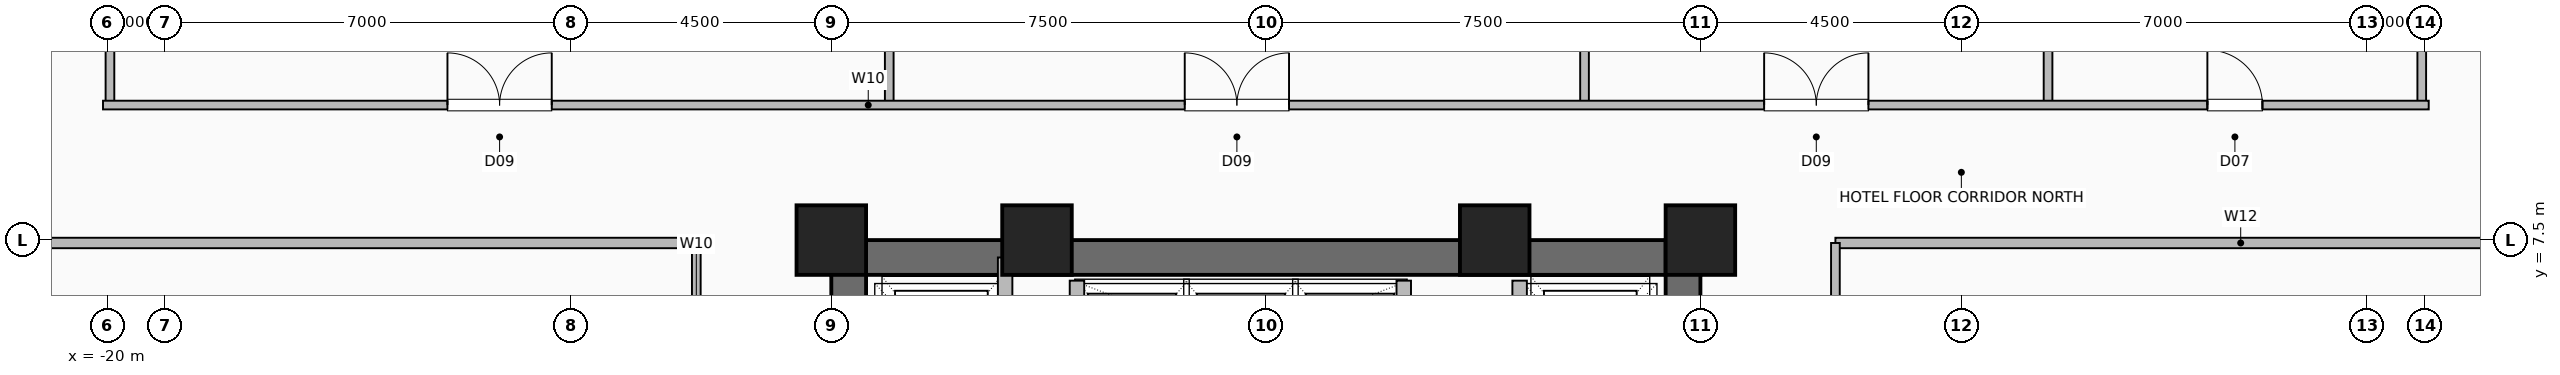
"""IFC4 building model, lengths in metres.
Left out: names, types, materials, properties, quantities, classifications, styles, units other than length and angle.
Written with IfcOpenShell. Run it as: python <this file> out.ifc"""

import sys

from ifc_helpers import new_model, si_unit, direction, frame, frame_2d, origin, origin_2d, place, context, subcontext, project, spatial, rectangle, hollow_rectangle, extrude, element, fill, save


model = new_model("IFC4")
c1 = context("Model", 3, precision=1e-05, world=origin(), true_north=direction((0.0, 1.0)))
c2 = subcontext(c1, "Body", "Model", "MODEL_VIEW")
j1 = project(units=[si_unit("LENGTHUNIT", "METRE"), si_unit("PLANEANGLEUNIT", "RADIAN")], contexts=[c1])
p1 = place(None, origin())
s1 = spatial("IfcSite", under=j1, at=p1, CompositionType="ELEMENT")
p2 = place(p1, origin())
s2 = spatial("IfcBuilding", under=s1, at=p2, CompositionType="ELEMENT")
p3 = place(p2, frame((0.0, 0.0, 55.0)))
s3 = spatial("IfcBuildingStorey", under=s2, at=p3, CompositionType="ELEMENT", Elevation=55.0)
for number, where, z_axis, x_axis in (
    (1, (7.5, 7.5, 0.0), (0.0, 0.0, 1.0), (1.0, 0.0, 0.0)),
    (2, (3.95, 7.5, 0.0), (0.0, 0.0, 1.0), (1.0, 0.0, 0.0)),
    (3, (-3.95, 7.5, 0.0), (0.0, 0.0, 1.0), (1.0, 0.0, 0.0)),
    (4, (-7.5, 7.5, 0.0), (0.0, 0.0, 1.0), (1.0, 0.0, 0.0)),
):
    element("IfcColumn", number, at=place(p3, frame(where, z_axis=z_axis, x_axis=x_axis)), inside=s3, PredefinedType="COLUMN", context=c2, shape_type="SweptSolid", body=[
        extrude(hollow_rectangle(XDim=1.2, YDim=1.2, WallThickness=0.055, at=origin_2d()), origin(), (0.0, 0.0, 1.0), 3.5),
    ])
p4 = place(p3, frame((-7.5, 7.2, 0.0), z_axis=(0.0, 0.0, 1.0), x_axis=(1.0, 0.0, 0.0)))
e5 = element("IfcWall", 5, at=p4, inside=s3, PredefinedType="SHEAR", context=c2, shape_type="SweptSolid", body=[
    extrude(rectangle(XDim=15.0, YDim=0.6, at=frame_2d((7.5, 0.0))), origin(), (0.0, 0.0, 1.0), 3.25),
])
p5 = place(p3, frame((-7.2, -7.5, 0.0), z_axis=(0.0, 0.0, 1.0), x_axis=(0.0, 1.0, 0.0)))
e6 = element("IfcWall", 6, at=p5, inside=s3, PredefinedType="SHEAR", context=c2, shape_type="SweptSolid", body=[
    extrude(rectangle(XDim=15.0, YDim=0.6, at=frame_2d((7.5, 0.0))), origin(), (0.0, 0.0, 1.0), 3.25),
])
p6 = place(p5, frame((9.5, 0.0, 0.0)))
e7 = element("IfcOpeningElement", 7, at=p6, cuts=e6, PredefinedType="OPENING", context=c2, shape_type="SweptSolid", body=[
    extrude(rectangle(XDim=1.0, YDim=2.08, at=frame_2d((0.5, 1.04))), frame((0.0, 0.31, 0.0), z_axis=(0.0, -1.0, 0.0), x_axis=(1.0, 0.0, 0.0)), (0.0, 0.0, 1.0), 0.62),
])
p7 = place(p3, frame((7.2, -7.5, 0.0), z_axis=(0.0, 0.0, 1.0), x_axis=(0.0, 1.0, 0.0)))
e8 = element("IfcWall", 8, at=p7, inside=s3, PredefinedType="SHEAR", context=c2, shape_type="SweptSolid", body=[
    extrude(rectangle(XDim=15.0, YDim=0.6, at=frame_2d((7.5, 0.0))), origin(), (0.0, 0.0, 1.0), 3.25),
])
for number, where, z_axis, x_axis in (
    (9, (-3.26, 4.58, 0.0), (0.0, 0.0, 1.0), (0.0, 1.0, 0.0)),
    (10, (2.38, 4.58, 0.0), (0.0, 0.0, 1.0), (0.0, 1.0, 0.0)),
):
    element("IfcWall", number, at=place(p3, frame(where, z_axis=z_axis, x_axis=x_axis)), inside=s3, PredefinedType="SHEAR", context=c2, shape_type="SweptSolid", body=[
        extrude(rectangle(XDim=2.22, YDim=0.25, at=frame_2d((1.11, 0.0))), origin(), (0.0, 0.0, 1.0), 3.25),
    ])
p8 = place(p3, frame((-4.5, 4.35, 0.0), z_axis=(0.0, 0.0, 1.0), x_axis=(0.0, 1.0, 0.0)))
e11 = element("IfcWall", 11, at=p8, inside=s3, PredefinedType="SHEAR", context=c2, shape_type="SweptSolid", body=[
    extrude(rectangle(XDim=2.85, YDim=0.25, at=frame_2d((1.425, 0.0))), origin(), (0.0, 0.0, 1.0), 3.25),
])
p9 = place(p3, frame((4.38, 4.3, 0.0), z_axis=(0.0, 0.0, 1.0), x_axis=(0.0, 1.0, 0.0)))
e12 = element("IfcWall", 12, at=p9, inside=s3, PredefinedType="SHEAR", context=c2, shape_type="SweptSolid", body=[
    extrude(rectangle(XDim=2.5, YDim=0.25, at=frame_2d((1.25, 0.0))), origin(), (0.0, 0.0, 1.0), 3.25),
])
p10 = place(p9, frame((0.8, 0.0, 0.0)))
e13 = element("IfcOpeningElement", 13, at=p10, cuts=e12, PredefinedType="OPENING", context=c2, shape_type="SweptSolid", body=[
    extrude(rectangle(XDim=1.2, YDim=2.2, at=frame_2d((0.6, 1.1))), frame((0.0, 0.135, 0.0), z_axis=(0.0, -1.0, 0.0), x_axis=(1.0, 0.0, 0.0)), (0.0, 0.0, 1.0), 0.27),
])
for number, where, z_axis, x_axis in (
    (14, (-19.95, 9.83, 0.0), (0.0, 0.0, 1.0), (0.0, 1.0, 0.0)),
    (15, (-6.5, 9.83, 0.0), (0.0, 0.0, 1.0), (0.0, 1.0, 0.0)),
    (16, (5.5, 9.83, 0.0), (0.0, 0.0, 1.0), (0.0, 1.0, 0.0)),
    (17, (13.5, 9.83, 0.0), (0.0, 0.0, 1.0), (0.0, 1.0, 0.0)),
    (18, (19.95, 9.83, 0.0), (0.0, 0.0, 1.0), (0.0, 1.0, 0.0)),
):
    element("IfcWall", number, at=place(p3, frame(where, z_axis=z_axis, x_axis=x_axis)), inside=s3, PredefinedType="PARTITIONING", context=c2, shape_type="SweptSolid", body=[
        extrude(rectangle(XDim=13.99, YDim=0.15, at=frame_2d((6.995, 0.0))), origin(), (0.0, 0.0, 1.0), 3.25),
    ])
p11 = place(p3, frame((-20.07, 9.83, 0.0), z_axis=(0.0, 0.0, 1.0), x_axis=(1.0, 0.0, 0.0)))
e19 = element("IfcWall", 19, at=p11, inside=s3, PredefinedType="PARTITIONING", context=c2, shape_type="SweptSolid", body=[
    extrude(rectangle(XDim=40.14, YDim=0.15, at=frame_2d((20.07, 0.0))), origin(), (0.0, 0.0, 1.0), 3.25),
])
p12 = place(p11, frame((5.945, 0.0, 0.0)))
e20 = element("IfcOpeningElement", 20, at=p12, cuts=e19, PredefinedType="OPENING", context=c2, shape_type="SweptSolid", body=[
    extrude(rectangle(XDim=1.8, YDim=2.08, at=frame_2d((0.9, 1.04))), frame((0.0, 0.085, 0.0), z_axis=(0.0, -1.0, 0.0), x_axis=(1.0, 0.0, 0.0)), (0.0, 0.0, 1.0), 0.17),
])
p13 = place(p11, frame((18.67, 0.0, 0.0)))
e21 = element("IfcOpeningElement", 21, at=p13, cuts=e19, PredefinedType="OPENING", context=c2, shape_type="SweptSolid", body=[
    extrude(rectangle(XDim=1.8, YDim=2.08, at=frame_2d((0.9, 1.04))), frame((0.0, 0.085, 0.0), z_axis=(0.0, -1.0, 0.0), x_axis=(1.0, 0.0, 0.0)), (0.0, 0.0, 1.0), 0.17),
])
p14 = place(p11, frame((28.67, 0.0, 0.0)))
e22 = element("IfcOpeningElement", 22, at=p14, cuts=e19, PredefinedType="OPENING", context=c2, shape_type="SweptSolid", body=[
    extrude(rectangle(XDim=1.8, YDim=2.08, at=frame_2d((0.9, 1.04))), frame((0.0, 0.085, 0.0), z_axis=(0.0, -1.0, 0.0), x_axis=(1.0, 0.0, 0.0)), (0.0, 0.0, 1.0), 0.17),
])
p15 = place(p11, frame((36.32, 0.0, 0.0)))
e23 = element("IfcOpeningElement", 23, at=p15, cuts=e19, PredefinedType="OPENING", context=c2, shape_type="SweptSolid", body=[
    extrude(rectangle(XDim=0.95, YDim=2.06, at=frame_2d((0.475, 1.03))), frame((0.0, 0.085, 0.0), z_axis=(0.0, -1.0, 0.0), x_axis=(1.0, 0.0, 0.0)), (0.0, 0.0, 1.0), 0.17),
])
p16 = place(p3, frame((-23.82, 7.45, 0.0), z_axis=(0.0, 0.0, 1.0), x_axis=(1.0, 0.0, 0.0)))
e24 = element("IfcWall", 24, at=p16, inside=s3, PredefinedType="PARTITIONING", context=c2, shape_type="SweptSolid", body=[
    extrude(rectangle(XDim=13.99, YDim=0.18, at=frame_2d((6.995, 0.0))), origin(), (0.0, 0.0, 1.0), 3.25),
])
p17 = place(p3, frame((-9.83, -7.45, 0.0), z_axis=(0.0, 0.0, 1.0), x_axis=(0.0, 1.0, 0.0)))
e25 = element("IfcWall", 25, at=p17, inside=s3, PredefinedType="PARTITIONING", context=c2, shape_type="SweptSolid", body=[
    extrude(rectangle(XDim=14.9, YDim=0.15, at=frame_2d((7.45, 0.0))), origin(), (0.0, 0.0, 1.0), 3.25),
])
p18 = place(p17, frame((3.049, 0.0, 0.0)))
e26 = element("IfcOpeningElement", 26, at=p18, cuts=e25, PredefinedType="OPENING", context=c2, shape_type="SweptSolid", body=[
    extrude(rectangle(XDim=0.95, YDim=2.08, at=frame_2d((0.475, 1.04))), frame((0.0, 0.085, 0.0), z_axis=(0.0, -1.0, 0.0), x_axis=(1.0, 0.0, 0.0)), (0.0, 0.0, 1.0), 0.17),
])
p19 = place(p17, frame((7.927, 0.0, 0.0)))
e27 = element("IfcOpeningElement", 27, at=p19, cuts=e25, PredefinedType="OPENING", context=c2, shape_type="SweptSolid", body=[
    extrude(rectangle(XDim=0.95, YDim=2.08, at=frame_2d((0.475, 1.04))), frame((0.0, 0.085, 0.0), z_axis=(0.0, -1.0, 0.0), x_axis=(1.0, 0.0, 0.0)), (0.0, 0.0, 1.0), 0.17),
])
p20 = place(p17, frame((12.899, 0.0, 0.0)))
e28 = element("IfcOpeningElement", 28, at=p20, cuts=e25, PredefinedType="OPENING", context=c2, shape_type="SweptSolid", body=[
    extrude(rectangle(XDim=0.95, YDim=2.08, at=frame_2d((0.475, 1.04))), frame((0.0, 0.085, 0.0), z_axis=(0.0, -1.0, 0.0), x_axis=(1.0, 0.0, 0.0)), (0.0, 0.0, 1.0), 0.17),
])
p21 = place(p3, frame((9.83, 7.45, 0.0), z_axis=(0.0, 0.0, 1.0), x_axis=(1.0, 0.0, 0.0)))
e29 = element("IfcWall", 29, at=p21, inside=s3, PredefinedType="PARTITIONING", context=c2, shape_type="SweptSolid", body=[
    extrude(rectangle(XDim=13.99, YDim=0.18, at=frame_2d((6.995, 0.0))), origin(), (0.0, 0.0, 1.0), 3.25),
])
p22 = place(p3, frame((9.83, -7.45, 0.0), z_axis=(0.0, 0.0, 1.0), x_axis=(0.0, 1.0, 0.0)))
e30 = element("IfcWall", 30, at=p22, inside=s3, PredefinedType="PARTITIONING", context=c2, shape_type="SweptSolid", body=[
    extrude(rectangle(XDim=14.9, YDim=0.15, at=frame_2d((7.45, 0.0))), origin(), (0.0, 0.0, 1.0), 3.25),
])
p23 = place(p22, frame((3.049, 0.0, 0.0)))
e31 = element("IfcOpeningElement", 31, at=p23, cuts=e30, PredefinedType="OPENING", context=c2, shape_type="SweptSolid", body=[
    extrude(rectangle(XDim=0.95, YDim=2.08, at=frame_2d((0.475, 1.04))), frame((0.0, 0.085, 0.0), z_axis=(0.0, -1.0, 0.0), x_axis=(1.0, 0.0, 0.0)), (0.0, 0.0, 1.0), 0.17),
])
p24 = place(p22, frame((7.927, 0.0, 0.0)))
e32 = element("IfcOpeningElement", 32, at=p24, cuts=e30, PredefinedType="OPENING", context=c2, shape_type="SweptSolid", body=[
    extrude(rectangle(XDim=0.95, YDim=2.08, at=frame_2d((0.475, 1.04))), frame((0.0, 0.085, 0.0), z_axis=(0.0, -1.0, 0.0), x_axis=(1.0, 0.0, 0.0)), (0.0, 0.0, 1.0), 0.17),
])
p25 = place(p22, frame((12.899, 0.0, 0.0)))
e33 = element("IfcOpeningElement", 33, at=p25, cuts=e30, PredefinedType="OPENING", context=c2, shape_type="SweptSolid", body=[
    extrude(rectangle(XDim=0.95, YDim=2.08, at=frame_2d((0.475, 1.04))), frame((0.0, 0.085, 0.0), z_axis=(0.0, -1.0, 0.0), x_axis=(1.0, 0.0, 0.0)), (0.0, 0.0, 1.0), 0.17),
])
p26 = place(p12, origin())
e34 = element("IfcDoor", 34, at=p26, inside=s3, OperationType="DOUBLE_DOOR_SINGLE_SWING", PredefinedType="DOOR", context=c2, shape_type="SweptSolid", body=[
    extrude(rectangle(XDim=1.8, YDim=2.08, at=frame_2d((0.9, 1.04))), frame((0.0, 0.025, 0.0), z_axis=(0.0, -1.0, 0.0), x_axis=(1.0, 0.0, 0.0)), (0.0, 0.0, 1.0), 0.05),
])
fill(e20, e34)
p27 = place(p13, origin())
e35 = element("IfcDoor", 35, at=p27, inside=s3, OperationType="DOUBLE_DOOR_SINGLE_SWING", PredefinedType="DOOR", context=c2, shape_type="SweptSolid", body=[
    extrude(rectangle(XDim=1.8, YDim=2.08, at=frame_2d((0.9, 1.04))), frame((0.0, 0.025, 0.0), z_axis=(0.0, -1.0, 0.0), x_axis=(1.0, 0.0, 0.0)), (0.0, 0.0, 1.0), 0.05),
])
fill(e21, e35)
p28 = place(p14, origin())
e36 = element("IfcDoor", 36, at=p28, inside=s3, OperationType="DOUBLE_DOOR_SINGLE_SWING", PredefinedType="DOOR", context=c2, shape_type="SweptSolid", body=[
    extrude(rectangle(XDim=1.8, YDim=2.08, at=frame_2d((0.9, 1.04))), frame((0.0, 0.025, 0.0), z_axis=(0.0, -1.0, 0.0), x_axis=(1.0, 0.0, 0.0)), (0.0, 0.0, 1.0), 0.05),
])
fill(e22, e36)
p29 = place(p15, origin())
e37 = element("IfcDoor", 37, at=p29, inside=s3, OperationType="SINGLE_SWING_LEFT", PredefinedType="DOOR", context=c2, shape_type="SweptSolid", body=[
    extrude(rectangle(XDim=0.95, YDim=2.06, at=frame_2d((0.475, 1.03))), frame((0.0, 0.025, 0.0), z_axis=(0.0, -1.0, 0.0), x_axis=(1.0, 0.0, 0.0)), (0.0, 0.0, 1.0), 0.05),
])
fill(e23, e37)
save(model, sys.argv[1])
